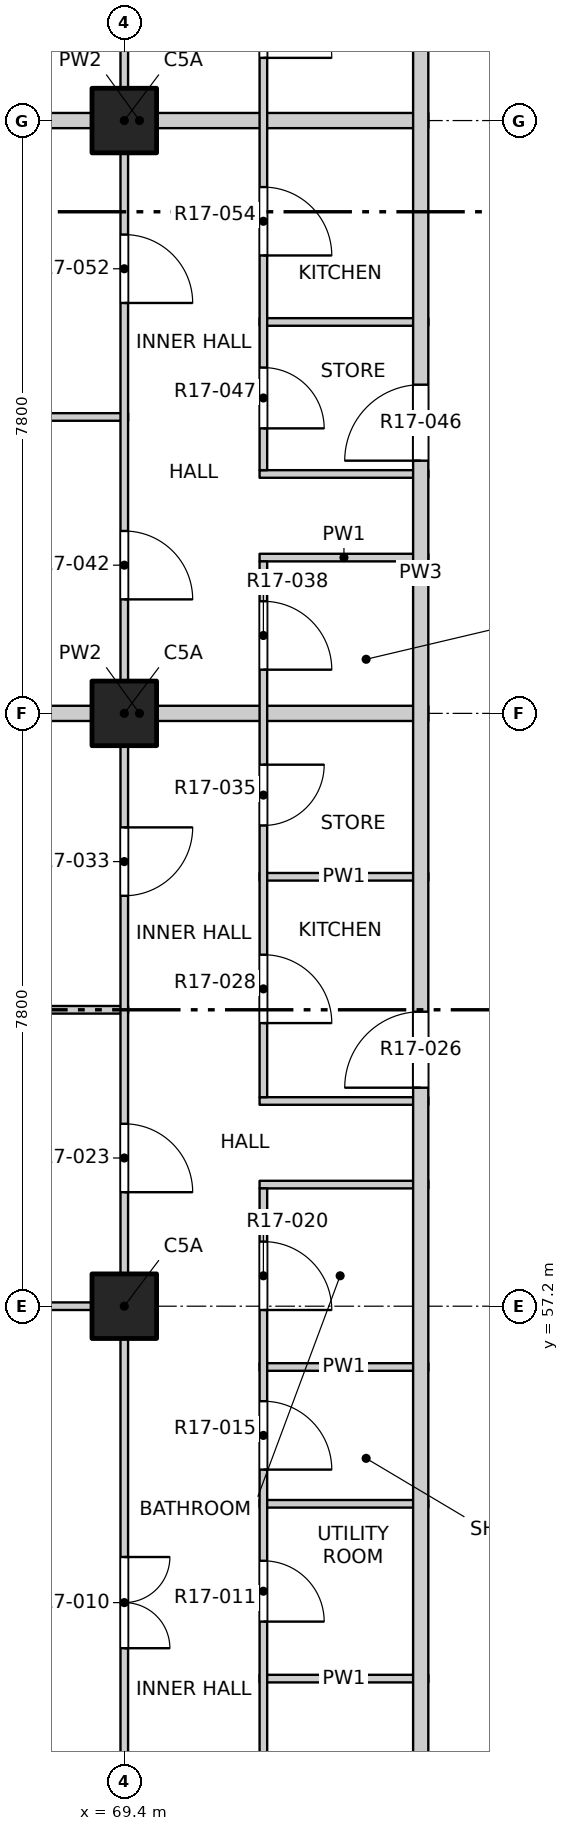
"""IFC4 building model, lengths in metres.
Left out: names, types, materials, properties, quantities, classifications, styles, units other than length and angle.
Written with IfcOpenShell. Run it as: python <this file> out.ifc"""

import sys

from ifc_helpers import new_model, si_unit, direction, frame, frame_2d, origin, origin_2d, place, context, subcontext, project, spatial, rectangle, extrude, element, fill, save


model = new_model("IFC4")
c1 = context("Model", 3, precision=1e-05, world=origin(), true_north=direction((0.0, 1.0)))
c2 = subcontext(c1, "Body", "Model", "MODEL_VIEW")
j1 = project(units=[si_unit("LENGTHUNIT", "METRE"), si_unit("PLANEANGLEUNIT", "RADIAN")], contexts=[c1])
p1 = place(None, origin())
s1 = spatial("IfcSite", under=j1, at=p1, CompositionType="ELEMENT")
p2 = place(p1, origin())
s2 = spatial("IfcBuilding", under=s1, at=p2, CompositionType="ELEMENT")
p3 = place(p2, frame((0.0, 0.0, 179.2)))
s3 = spatial("IfcBuildingStorey", under=s2, at=p3, CompositionType="ELEMENT", Elevation=179.2)
for number, where, z_axis, x_axis in (
    (1, (69.4, 57.2, -0.3), (0.0, 0.0, 1.0), (1.0, 0.0, 0.0)),
    (2, (69.4, 65.0, -0.3), (0.0, 0.0, 1.0), (1.0, 0.0, 0.0)),
    (3, (69.4, 72.8, -0.3), (0.0, 0.0, 1.0), (1.0, 0.0, 0.0)),
):
    element("IfcColumn", number, at=place(p3, frame(where, z_axis=z_axis, x_axis=x_axis)), inside=s3, PredefinedType="COLUMN", context=c2, shape_type="SweptSolid", body=[
        extrude(rectangle(XDim=0.85, YDim=0.85, at=origin_2d()), origin(), (0.0, 0.0, 1.0), 3.45),
    ])
for number, where, z_axis, x_axis in (
    (4, (71.18, 52.3, 0.0), (0.0, 0.0, 1.0), (1.0, 0.0, 0.0)),
    (5, (71.18, 54.6, 0.0), (0.0, 0.0, 1.0), (1.0, 0.0, 0.0)),
    (6, (71.18, 56.4, 0.0), (0.0, 0.0, 1.0), (1.0, 0.0, 0.0)),
):
    element("IfcWall", number, at=place(p3, frame(where, z_axis=z_axis, x_axis=x_axis)), inside=s3, PredefinedType="PARTITIONING", context=c2, shape_type="SweptSolid", body=[
        extrude(rectangle(XDim=2.22, YDim=0.1, at=frame_2d((1.11, 0.0))), origin(), (0.0, 0.0, 1.0), 3.15),
    ])
p4 = place(p3, frame((65.8, 57.2, 0.0), z_axis=(0.0, 0.0, 1.0), x_axis=(1.0, 0.0, 0.0)))
e7 = element("IfcWall", 7, at=p4, inside=s3, PredefinedType="PARTITIONING", context=c2, shape_type="SweptSolid", body=[
    extrude(rectangle(XDim=3.65, YDim=0.1, at=frame_2d((1.825, 0.0))), origin(), (0.0, 0.0, 1.0), 3.15),
])
for number, where, z_axis, x_axis in (
    (8, (71.18, 58.8, 0.0), (0.0, 0.0, 1.0), (1.0, 0.0, 0.0)),
    (9, (71.18, 59.9, 0.0), (0.0, 0.0, 1.0), (1.0, 0.0, 0.0)),
):
    element("IfcWall", number, at=place(p3, frame(where, z_axis=z_axis, x_axis=x_axis)), inside=s3, PredefinedType="PARTITIONING", context=c2, shape_type="SweptSolid", body=[
        extrude(rectangle(XDim=2.22, YDim=0.1, at=frame_2d((1.11, 0.0))), origin(), (0.0, 0.0, 1.0), 3.15),
    ])
p5 = place(p3, frame((65.8, 61.1, 0.0), z_axis=(0.0, 0.0, 1.0), x_axis=(1.0, 0.0, 0.0)))
e10 = element("IfcWall", 10, at=p5, inside=s3, PredefinedType="PARTITIONING", context=c2, shape_type="SweptSolid", body=[
    extrude(rectangle(XDim=3.65, YDim=0.1, at=frame_2d((1.825, 0.0))), origin(), (0.0, 0.0, 1.0), 2.55),
])
p6 = place(p3, frame((71.18, 62.85, 0.0), z_axis=(0.0, 0.0, 1.0), x_axis=(1.0, 0.0, 0.0)))
e11 = element("IfcWall", 11, at=p6, inside=s3, PredefinedType="PARTITIONING", context=c2, shape_type="SweptSolid", body=[
    extrude(rectangle(XDim=2.22, YDim=0.1, at=frame_2d((1.11, 0.0))), origin(), (0.0, 0.0, 1.0), 3.15),
])
p7 = place(p3, frame((65.8, 65.0, 0.0), z_axis=(0.0, 0.0, 1.0), x_axis=(1.0, 0.0, 0.0)))
e12 = element("IfcWall", 12, at=p7, inside=s3, PredefinedType="PARTITIONING", context=c2, shape_type="SweptSolid", body=[
    extrude(rectangle(XDim=7.6, YDim=0.2, at=frame_2d((3.8, 0.0))), origin(), (0.0, 0.0, 1.0), 3.15),
])
for number, where, z_axis, x_axis in (
    (13, (71.18, 67.05, 0.0), (0.0, 0.0, 1.0), (1.0, 0.0, 0.0)),
    (14, (71.18, 68.15, 0.0), (0.0, 0.0, 1.0), (1.0, 0.0, 0.0)),
):
    element("IfcWall", number, at=place(p3, frame(where, z_axis=z_axis, x_axis=x_axis)), inside=s3, PredefinedType="PARTITIONING", context=c2, shape_type="SweptSolid", body=[
        extrude(rectangle(XDim=2.22, YDim=0.1, at=frame_2d((1.11, 0.0))), origin(), (0.0, 0.0, 1.0), 3.15),
    ])
p8 = place(p3, frame((65.8, 68.9, 0.0), z_axis=(0.0, 0.0, 1.0), x_axis=(1.0, 0.0, 0.0)))
e15 = element("IfcWall", 15, at=p8, inside=s3, PredefinedType="PARTITIONING", context=c2, shape_type="SweptSolid", body=[
    extrude(rectangle(XDim=3.65, YDim=0.1, at=frame_2d((1.825, 0.0))), origin(), (0.0, 0.0, 1.0), 2.55),
])
p9 = place(p3, frame((71.18, 70.15, 0.0), z_axis=(0.0, 0.0, 1.0), x_axis=(1.0, 0.0, 0.0)))
e16 = element("IfcWall", 16, at=p9, inside=s3, PredefinedType="PARTITIONING", context=c2, shape_type="SweptSolid", body=[
    extrude(rectangle(XDim=2.22, YDim=0.1, at=frame_2d((1.11, 0.0))), origin(), (0.0, 0.0, 1.0), 3.15),
])
p10 = place(p3, frame((65.8, 72.8, 0.0), z_axis=(0.0, 0.0, 1.0), x_axis=(1.0, 0.0, 0.0)))
e17 = element("IfcWall", 17, at=p10, inside=s3, PredefinedType="PARTITIONING", context=c2, shape_type="SweptSolid", body=[
    extrude(rectangle(XDim=7.6, YDim=0.2, at=frame_2d((3.8, 0.0))), origin(), (0.0, 0.0, 1.0), 3.15),
])
p11 = place(p3, frame((69.4, 45.8, 0.0), z_axis=(0.0, 0.0, 1.0), x_axis=(0.0, 1.0, 0.0)))
e18 = element("IfcWall", 18, at=p11, inside=s3, PredefinedType="PARTITIONING", context=c2, shape_type="SweptSolid", body=[
    extrude(rectangle(XDim=38.4, YDim=0.1, at=frame_2d((19.2, 0.0))), origin(), (0.0, 0.0, 1.0), 3.15),
])
p12 = place(p11, frame((1.05, 0.0, 0.0)))
e19 = element("IfcOpeningElement", 19, at=p12, cuts=e18, PredefinedType="OPENING", context=c2, shape_type="SweptSolid", body=[
    extrude(rectangle(XDim=1.2, YDim=2.1, at=frame_2d((0.6, 1.05))), frame((0.0, 0.06, 0.0), z_axis=(0.0, -1.0, 0.0), x_axis=(1.0, 0.0, 0.0)), (0.0, 0.0, 1.0), 0.12),
])
p13 = place(p11, frame((6.9, 0.0, 0.0)))
e20 = element("IfcOpeningElement", 20, at=p13, cuts=e18, PredefinedType="OPENING", context=c2, shape_type="SweptSolid", body=[
    extrude(rectangle(XDim=1.2, YDim=2.1, at=frame_2d((0.6, 1.05))), frame((0.0, 0.06, 0.0), z_axis=(0.0, -1.0, 0.0), x_axis=(1.0, 0.0, 0.0)), (0.0, 0.0, 1.0), 0.12),
])
p14 = place(p11, frame((12.9, 0.0, 0.0)))
e21 = element("IfcOpeningElement", 21, at=p14, cuts=e18, PredefinedType="OPENING", context=c2, shape_type="SweptSolid", body=[
    extrude(rectangle(XDim=0.9, YDim=2.1, at=frame_2d((0.45, 1.05))), frame((0.0, 0.06, 0.0), z_axis=(0.0, -1.0, 0.0), x_axis=(1.0, 0.0, 0.0)), (0.0, 0.0, 1.0), 0.12),
])
p15 = place(p11, frame((16.8, 0.0, 0.0)))
e22 = element("IfcOpeningElement", 22, at=p15, cuts=e18, PredefinedType="OPENING", context=c2, shape_type="SweptSolid", body=[
    extrude(rectangle(XDim=0.9, YDim=2.1, at=frame_2d((0.45, 1.05))), frame((0.0, 0.06, 0.0), z_axis=(0.0, -1.0, 0.0), x_axis=(1.0, 0.0, 0.0)), (0.0, 0.0, 1.0), 0.12),
])
p16 = place(p11, frame((20.7, 0.0, 0.0)))
e23 = element("IfcOpeningElement", 23, at=p16, cuts=e18, PredefinedType="OPENING", context=c2, shape_type="SweptSolid", body=[
    extrude(rectangle(XDim=0.9, YDim=2.1, at=frame_2d((0.45, 1.05))), frame((0.0, 0.06, 0.0), z_axis=(0.0, -1.0, 0.0), x_axis=(1.0, 0.0, 0.0)), (0.0, 0.0, 1.0), 0.12),
])
p17 = place(p11, frame((24.6, 0.0, 0.0)))
e24 = element("IfcOpeningElement", 24, at=p17, cuts=e18, PredefinedType="OPENING", context=c2, shape_type="SweptSolid", body=[
    extrude(rectangle(XDim=0.9, YDim=2.1, at=frame_2d((0.45, 1.05))), frame((0.0, 0.06, 0.0), z_axis=(0.0, -1.0, 0.0), x_axis=(1.0, 0.0, 0.0)), (0.0, 0.0, 1.0), 0.12),
])
p18 = place(p11, frame((28.5, 0.0, 0.0)))
e25 = element("IfcOpeningElement", 25, at=p18, cuts=e18, PredefinedType="OPENING", context=c2, shape_type="SweptSolid", body=[
    extrude(rectangle(XDim=0.9, YDim=2.1, at=frame_2d((0.45, 1.05))), frame((0.0, 0.06, 0.0), z_axis=(0.0, -1.0, 0.0), x_axis=(1.0, 0.0, 0.0)), (0.0, 0.0, 1.0), 0.12),
])
p19 = place(p11, frame((32.4, 0.0, 0.0)))
e26 = element("IfcOpeningElement", 26, at=p19, cuts=e18, PredefinedType="OPENING", context=c2, shape_type="SweptSolid", body=[
    extrude(rectangle(XDim=0.9, YDim=2.1, at=frame_2d((0.45, 1.05))), frame((0.0, 0.06, 0.0), z_axis=(0.0, -1.0, 0.0), x_axis=(1.0, 0.0, 0.0)), (0.0, 0.0, 1.0), 0.12),
])
p20 = place(p11, frame((36.15, 0.0, 0.0)))
e27 = element("IfcOpeningElement", 27, at=p20, cuts=e18, PredefinedType="OPENING", context=c2, shape_type="SweptSolid", body=[
    extrude(rectangle(XDim=1.2, YDim=2.1, at=frame_2d((0.6, 1.05))), frame((0.0, 0.06, 0.0), z_axis=(0.0, -1.0, 0.0), x_axis=(1.0, 0.0, 0.0)), (0.0, 0.0, 1.0), 0.12),
])
p21 = place(p3, frame((71.23, 49.45, 0.0), z_axis=(0.0, 0.0, 1.0), x_axis=(0.0, 1.0, 0.0)))
e28 = element("IfcWall", 28, at=p21, inside=s3, PredefinedType="PARTITIONING", context=c2, shape_type="SweptSolid", body=[
    extrude(rectangle(XDim=9.3, YDim=0.1, at=frame_2d((4.65, 0.0))), origin(), (0.0, 0.0, 1.0), 3.15),
])
p22 = place(p21, frame((1.0, 0.0, 0.0)))
e29 = element("IfcOpeningElement", 29, at=p22, cuts=e28, PredefinedType="OPENING", context=c2, shape_type="SweptSolid", body=[
    extrude(rectangle(XDim=0.8, YDim=2.1, at=frame_2d((0.4, 1.05))), frame((0.0, 0.06, 0.0), z_axis=(0.0, -1.0, 0.0), x_axis=(1.0, 0.0, 0.0)), (0.0, 0.0, 1.0), 0.12),
])
p23 = place(p21, frame((3.6, 0.0, 0.0)))
e30 = element("IfcOpeningElement", 30, at=p23, cuts=e28, PredefinedType="OPENING", context=c2, shape_type="SweptSolid", body=[
    extrude(rectangle(XDim=0.8, YDim=2.1, at=frame_2d((0.4, 1.05))), frame((0.0, 0.06, 0.0), z_axis=(0.0, -1.0, 0.0), x_axis=(1.0, 0.0, 0.0)), (0.0, 0.0, 1.0), 0.12),
])
p24 = place(p21, frame((5.6, 0.0, 0.0)))
e31 = element("IfcOpeningElement", 31, at=p24, cuts=e28, PredefinedType="OPENING", context=c2, shape_type="SweptSolid", body=[
    extrude(rectangle(XDim=0.9, YDim=2.1, at=frame_2d((0.45, 1.05))), frame((0.0, 0.06, 0.0), z_axis=(0.0, -1.0, 0.0), x_axis=(1.0, 0.0, 0.0)), (0.0, 0.0, 1.0), 0.12),
])
p25 = place(p21, frame((7.7, 0.0, 0.0)))
e32 = element("IfcOpeningElement", 32, at=p25, cuts=e28, PredefinedType="OPENING", context=c2, shape_type="SweptSolid", body=[
    extrude(rectangle(XDim=0.9, YDim=2.1, at=frame_2d((0.45, 1.05))), frame((0.0, 0.06, 0.0), z_axis=(0.0, -1.0, 0.0), x_axis=(1.0, 0.0, 0.0)), (0.0, 0.0, 1.0), 0.12),
])
p26 = place(p3, frame((71.23, 59.95, 0.0), z_axis=(0.0, 0.0, 1.0), x_axis=(0.0, 1.0, 0.0)))
e33 = element("IfcWall", 33, at=p26, inside=s3, PredefinedType="PARTITIONING", context=c2, shape_type="SweptSolid", body=[
    extrude(rectangle(XDim=7.05, YDim=0.1, at=frame_2d((3.525, 0.0))), origin(), (0.0, 0.0, 1.0), 3.15),
])
p27 = place(p26, frame((0.975, 0.0, 0.0)))
e34 = element("IfcOpeningElement", 34, at=p27, cuts=e33, PredefinedType="OPENING", context=c2, shape_type="SweptSolid", body=[
    extrude(rectangle(XDim=0.9, YDim=2.1, at=frame_2d((0.45, 1.05))), frame((0.0, 0.06, 0.0), z_axis=(0.0, -1.0, 0.0), x_axis=(1.0, 0.0, 0.0)), (0.0, 0.0, 1.0), 0.12),
])
p28 = place(p26, frame((3.575, 0.0, 0.0)))
e35 = element("IfcOpeningElement", 35, at=p28, cuts=e33, PredefinedType="OPENING", context=c2, shape_type="SweptSolid", body=[
    extrude(rectangle(XDim=0.8, YDim=2.1, at=frame_2d((0.4, 1.05))), frame((0.0, 0.06, 0.0), z_axis=(0.0, -1.0, 0.0), x_axis=(1.0, 0.0, 0.0)), (0.0, 0.0, 1.0), 0.12),
])
p29 = place(p26, frame((5.625, 0.0, 0.0)))
e36 = element("IfcOpeningElement", 36, at=p29, cuts=e33, PredefinedType="OPENING", context=c2, shape_type="SweptSolid", body=[
    extrude(rectangle(XDim=0.9, YDim=2.1, at=frame_2d((0.45, 1.05))), frame((0.0, 0.06, 0.0), z_axis=(0.0, -1.0, 0.0), x_axis=(1.0, 0.0, 0.0)), (0.0, 0.0, 1.0), 0.12),
])
p30 = place(p3, frame((71.23, 68.2, 0.0), z_axis=(0.0, 0.0, 1.0), x_axis=(0.0, 1.0, 0.0)))
e37 = element("IfcWall", 37, at=p30, inside=s3, PredefinedType="PARTITIONING", context=c2, shape_type="SweptSolid", body=[
    extrude(rectangle(XDim=9.05, YDim=0.1, at=frame_2d((4.525, 0.0))), origin(), (0.0, 0.0, 1.0), 3.15),
])
p31 = place(p30, frame((0.55, 0.0, 0.0)))
e38 = element("IfcOpeningElement", 38, at=p31, cuts=e37, PredefinedType="OPENING", context=c2, shape_type="SweptSolid", body=[
    extrude(rectangle(XDim=0.8, YDim=2.1, at=frame_2d((0.4, 1.05))), frame((0.0, 0.06, 0.0), z_axis=(0.0, -1.0, 0.0), x_axis=(1.0, 0.0, 0.0)), (0.0, 0.0, 1.0), 0.12),
])
p32 = place(p30, frame((2.825, 0.0, 0.0)))
e39 = element("IfcOpeningElement", 39, at=p32, cuts=e37, PredefinedType="OPENING", context=c2, shape_type="SweptSolid", body=[
    extrude(rectangle(XDim=0.9, YDim=2.1, at=frame_2d((0.45, 1.05))), frame((0.0, 0.06, 0.0), z_axis=(0.0, -1.0, 0.0), x_axis=(1.0, 0.0, 0.0)), (0.0, 0.0, 1.0), 0.12),
])
p33 = place(p30, frame((5.425, 0.0, 0.0)))
e40 = element("IfcOpeningElement", 40, at=p33, cuts=e37, PredefinedType="OPENING", context=c2, shape_type="SweptSolid", body=[
    extrude(rectangle(XDim=0.9, YDim=2.1, at=frame_2d((0.45, 1.05))), frame((0.0, 0.06, 0.0), z_axis=(0.0, -1.0, 0.0), x_axis=(1.0, 0.0, 0.0)), (0.0, 0.0, 1.0), 0.12),
])
p34 = place(p30, frame((7.675, 0.0, 0.0)))
e41 = element("IfcOpeningElement", 41, at=p34, cuts=e37, PredefinedType="OPENING", context=c2, shape_type="SweptSolid", body=[
    extrude(rectangle(XDim=0.9, YDim=2.1, at=frame_2d((0.45, 1.05))), frame((0.0, 0.06, 0.0), z_axis=(0.0, -1.0, 0.0), x_axis=(1.0, 0.0, 0.0)), (0.0, 0.0, 1.0), 0.12),
])
p35 = place(p3, frame((73.3, 49.5, 0.0), z_axis=(0.0, 0.0, 1.0), x_axis=(0.0, 1.0, 0.0)))
e42 = element("IfcWall", 42, at=p35, inside=s3, PredefinedType="PARTITIONING", context=c2, shape_type="SweptSolid", body=[
    extrude(rectangle(XDim=34.7, YDim=0.2, at=frame_2d((17.35, 0.0))), origin(), (0.0, 0.0, 1.0), 3.15),
])
p36 = place(p35, frame((10.575, 0.0, 0.0)))
e43 = element("IfcOpeningElement", 43, at=p36, cuts=e42, PredefinedType="OPENING", context=c2, shape_type="SweptSolid", body=[
    extrude(rectangle(XDim=1.0, YDim=2.1, at=frame_2d((0.5, 1.05))), frame((0.0, 0.11, 0.0), z_axis=(0.0, -1.0, 0.0), x_axis=(1.0, 0.0, 0.0)), (0.0, 0.0, 1.0), 0.22),
])
p37 = place(p35, frame((18.825, 0.0, 0.0)))
e44 = element("IfcOpeningElement", 44, at=p37, cuts=e42, PredefinedType="OPENING", context=c2, shape_type="SweptSolid", body=[
    extrude(rectangle(XDim=1.0, YDim=2.1, at=frame_2d((0.5, 1.05))), frame((0.0, 0.11, 0.0), z_axis=(0.0, -1.0, 0.0), x_axis=(1.0, 0.0, 0.0)), (0.0, 0.0, 1.0), 0.22),
])
p38 = place(p35, frame((29.075, 0.0, 0.0)))
e45 = element("IfcOpeningElement", 45, at=p38, cuts=e42, PredefinedType="OPENING", context=c2, shape_type="SweptSolid", body=[
    extrude(rectangle(XDim=1.0, YDim=2.1, at=frame_2d((0.5, 1.05))), frame((0.0, 0.11, 0.0), z_axis=(0.0, -1.0, 0.0), x_axis=(1.0, 0.0, 0.0)), (0.0, 0.0, 1.0), 0.22),
])
p39 = place(p13, origin())
e46 = element("IfcDoor", 46, at=p39, inside=s3, OperationType="DOUBLE_DOOR_SINGLE_SWING", PredefinedType="DOOR", context=c2, shape_type="SweptSolid", body=[
    extrude(rectangle(XDim=1.2, YDim=2.1, at=frame_2d((0.6, 1.05))), frame((0.0, 0.025, 0.0), z_axis=(0.0, -1.0, 0.0), x_axis=(1.0, 0.0, 0.0)), (0.0, 0.0, 1.0), 0.05),
])
fill(e20, e46)
p40 = place(p23, origin())
e47 = element("IfcDoor", 47, at=p40, inside=s3, OperationType="SINGLE_SWING_RIGHT", PredefinedType="DOOR", context=c2, shape_type="SweptSolid", body=[
    extrude(rectangle(XDim=0.8, YDim=2.1, at=frame_2d((0.4, 1.05))), frame((0.0, 0.025, 0.0), z_axis=(0.0, -1.0, 0.0), x_axis=(1.0, 0.0, 0.0)), (0.0, 0.0, 1.0), 0.05),
])
fill(e30, e47)
p41 = place(p24, origin())
e48 = element("IfcDoor", 48, at=p41, inside=s3, OperationType="SINGLE_SWING_RIGHT", PredefinedType="DOOR", context=c2, shape_type="SweptSolid", body=[
    extrude(rectangle(XDim=0.9, YDim=2.1, at=frame_2d((0.45, 1.05))), frame((0.0, 0.025, 0.0), z_axis=(0.0, -1.0, 0.0), x_axis=(1.0, 0.0, 0.0)), (0.0, 0.0, 1.0), 0.05),
])
fill(e31, e48)
p42 = place(p25, origin())
e49 = element("IfcDoor", 49, at=p42, inside=s3, OperationType="SINGLE_SWING_RIGHT", PredefinedType="DOOR", context=c2, shape_type="SweptSolid", body=[
    extrude(rectangle(XDim=0.9, YDim=2.1, at=frame_2d((0.45, 1.05))), frame((0.0, 0.025, 0.0), z_axis=(0.0, -1.0, 0.0), x_axis=(1.0, 0.0, 0.0)), (0.0, 0.0, 1.0), 0.05),
])
fill(e32, e49)
p43 = place(p14, origin())
e50 = element("IfcDoor", 50, at=p43, inside=s3, OperationType="SINGLE_SWING_RIGHT", PredefinedType="DOOR", context=c2, shape_type="SweptSolid", body=[
    extrude(rectangle(XDim=0.9, YDim=2.1, at=frame_2d((0.45, 1.05))), frame((0.0, 0.025, 0.0), z_axis=(0.0, -1.0, 0.0), x_axis=(1.0, 0.0, 0.0)), (0.0, 0.0, 1.0), 0.05),
])
fill(e21, e50)
p44 = place(p36, origin())
e51 = element("IfcDoor", 51, at=p44, inside=s3, OperationType="SINGLE_SWING_RIGHT", PredefinedType="DOOR", context=c2, shape_type="SweptSolid", body=[
    extrude(rectangle(XDim=1.0, YDim=2.1, at=frame_2d((0.5, 1.05))), frame((0.0, 0.025, 0.0), z_axis=(0.0, -1.0, 0.0), x_axis=(1.0, 0.0, 0.0)), (0.0, 0.0, 1.0), 0.05),
])
fill(e43, e51)
p45 = place(p27, origin())
e52 = element("IfcDoor", 52, at=p45, inside=s3, OperationType="SINGLE_SWING_RIGHT", PredefinedType="DOOR", context=c2, shape_type="SweptSolid", body=[
    extrude(rectangle(XDim=0.9, YDim=2.1, at=frame_2d((0.45, 1.05))), frame((0.0, 0.025, 0.0), z_axis=(0.0, -1.0, 0.0), x_axis=(1.0, 0.0, 0.0)), (0.0, 0.0, 1.0), 0.05),
])
fill(e34, e52)
p46 = place(p15, origin())
e53 = element("IfcDoor", 53, at=p46, inside=s3, OperationType="SINGLE_SWING_LEFT", PredefinedType="DOOR", context=c2, shape_type="SweptSolid", body=[
    extrude(rectangle(XDim=0.9, YDim=2.1, at=frame_2d((0.45, 1.05))), frame((0.0, 0.025, 0.0), z_axis=(0.0, -1.0, 0.0), x_axis=(1.0, 0.0, 0.0)), (0.0, 0.0, 1.0), 0.05),
])
fill(e22, e53)
p47 = place(p28, origin())
e54 = element("IfcDoor", 54, at=p47, inside=s3, OperationType="SINGLE_SWING_LEFT", PredefinedType="DOOR", context=c2, shape_type="SweptSolid", body=[
    extrude(rectangle(XDim=0.8, YDim=2.1, at=frame_2d((0.4, 1.05))), frame((0.0, 0.025, 0.0), z_axis=(0.0, -1.0, 0.0), x_axis=(1.0, 0.0, 0.0)), (0.0, 0.0, 1.0), 0.05),
])
fill(e35, e54)
p48 = place(p29, origin())
e55 = element("IfcDoor", 55, at=p48, inside=s3, OperationType="SINGLE_SWING_RIGHT", PredefinedType="DOOR", context=c2, shape_type="SweptSolid", body=[
    extrude(rectangle(XDim=0.9, YDim=2.1, at=frame_2d((0.45, 1.05))), frame((0.0, 0.025, 0.0), z_axis=(0.0, -1.0, 0.0), x_axis=(1.0, 0.0, 0.0)), (0.0, 0.0, 1.0), 0.05),
])
fill(e36, e55)
p49 = place(p16, origin())
e56 = element("IfcDoor", 56, at=p49, inside=s3, OperationType="SINGLE_SWING_RIGHT", PredefinedType="DOOR", context=c2, shape_type="SweptSolid", body=[
    extrude(rectangle(XDim=0.9, YDim=2.1, at=frame_2d((0.45, 1.05))), frame((0.0, 0.025, 0.0), z_axis=(0.0, -1.0, 0.0), x_axis=(1.0, 0.0, 0.0)), (0.0, 0.0, 1.0), 0.05),
])
fill(e23, e56)
p50 = place(p37, origin())
e57 = element("IfcDoor", 57, at=p50, inside=s3, OperationType="SINGLE_SWING_RIGHT", PredefinedType="DOOR", context=c2, shape_type="SweptSolid", body=[
    extrude(rectangle(XDim=1.0, YDim=2.1, at=frame_2d((0.5, 1.05))), frame((0.0, 0.025, 0.0), z_axis=(0.0, -1.0, 0.0), x_axis=(1.0, 0.0, 0.0)), (0.0, 0.0, 1.0), 0.05),
])
fill(e44, e57)
p51 = place(p31, origin())
e58 = element("IfcDoor", 58, at=p51, inside=s3, OperationType="SINGLE_SWING_RIGHT", PredefinedType="DOOR", context=c2, shape_type="SweptSolid", body=[
    extrude(rectangle(XDim=0.8, YDim=2.1, at=frame_2d((0.4, 1.05))), frame((0.0, 0.025, 0.0), z_axis=(0.0, -1.0, 0.0), x_axis=(1.0, 0.0, 0.0)), (0.0, 0.0, 1.0), 0.05),
])
fill(e38, e58)
p52 = place(p17, origin())
e59 = element("IfcDoor", 59, at=p52, inside=s3, OperationType="SINGLE_SWING_RIGHT", PredefinedType="DOOR", context=c2, shape_type="SweptSolid", body=[
    extrude(rectangle(XDim=0.9, YDim=2.1, at=frame_2d((0.45, 1.05))), frame((0.0, 0.025, 0.0), z_axis=(0.0, -1.0, 0.0), x_axis=(1.0, 0.0, 0.0)), (0.0, 0.0, 1.0), 0.05),
])
fill(e24, e59)
p53 = place(p32, origin())
e60 = element("IfcDoor", 60, at=p53, inside=s3, OperationType="SINGLE_SWING_RIGHT", PredefinedType="DOOR", context=c2, shape_type="SweptSolid", body=[
    extrude(rectangle(XDim=0.9, YDim=2.1, at=frame_2d((0.45, 1.05))), frame((0.0, 0.025, 0.0), z_axis=(0.0, -1.0, 0.0), x_axis=(1.0, 0.0, 0.0)), (0.0, 0.0, 1.0), 0.05),
])
fill(e39, e60)
p54 = place(p33, origin())
e61 = element("IfcDoor", 61, at=p54, inside=s3, OperationType="SINGLE_SWING_RIGHT", PredefinedType="DOOR", context=c2, shape_type="SweptSolid", body=[
    extrude(rectangle(XDim=0.9, YDim=2.1, at=frame_2d((0.45, 1.05))), frame((0.0, 0.025, 0.0), z_axis=(0.0, -1.0, 0.0), x_axis=(1.0, 0.0, 0.0)), (0.0, 0.0, 1.0), 0.05),
])
fill(e40, e61)
save(model, sys.argv[1])
